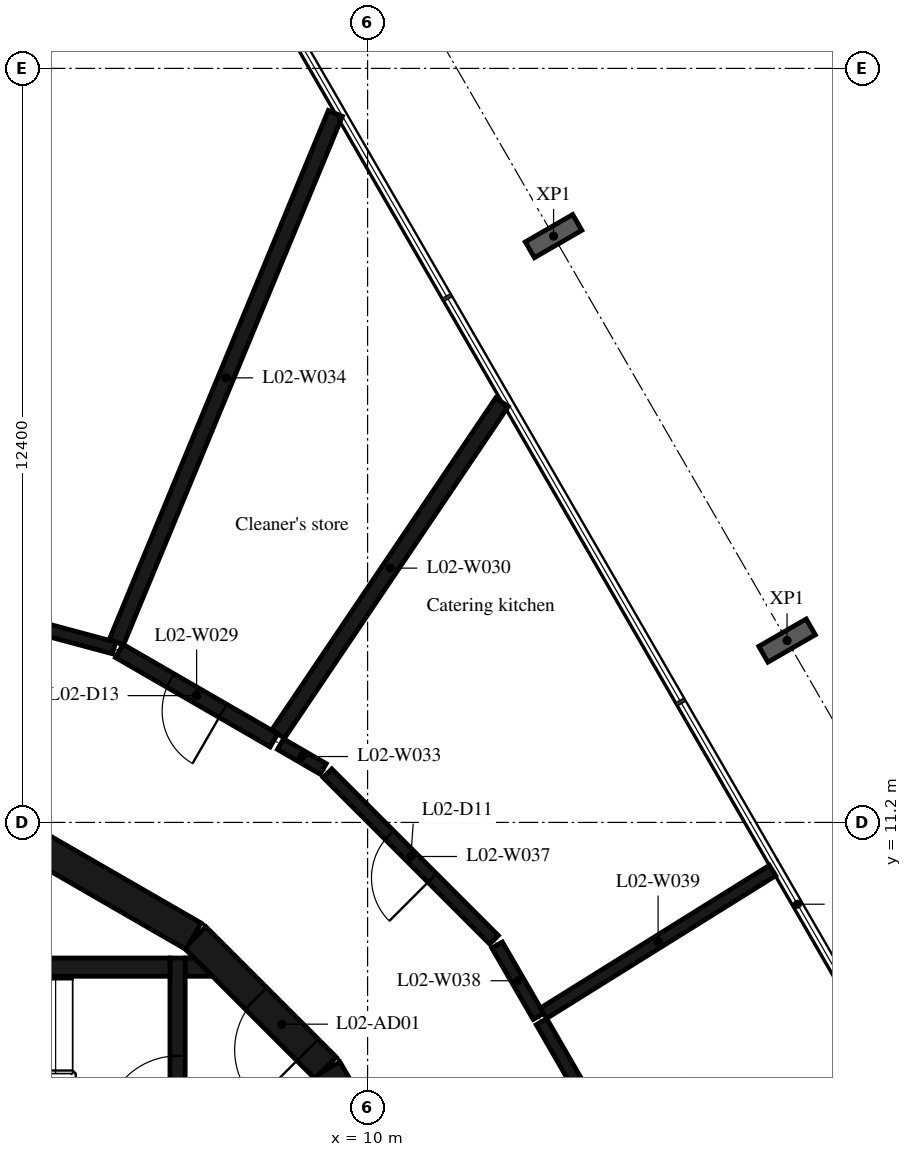
"""IFC4 building model, lengths in metres.
Left out: names, types, materials, properties, quantities, classifications, styles, units other than length and angle.
Written with IfcOpenShell. Run it as: python <this file> out.ifc"""

import sys

from ifc_helpers import new_model, si_unit, direction, frame, frame_2d, origin, origin_2d, place, context, subcontext, project, spatial, polyline, rectangle, i_section, outline, extrude, element, fill, save


model = new_model("IFC4")
c1 = context("Model", 3, precision=1e-05, world=origin(), true_north=direction((0.0, 1.0)))
c2 = subcontext(c1, "Body", "Model", "MODEL_VIEW")
j1 = project(units=[si_unit("LENGTHUNIT", "METRE"), si_unit("PLANEANGLEUNIT", "RADIAN")], contexts=[c1])
p1 = place(None, origin())
s1 = spatial("IfcSite", under=j1, at=p1, CompositionType="ELEMENT")
p2 = place(p1, origin())
s2 = spatial("IfcBuilding", under=s1, at=p2, CompositionType="ELEMENT")
p3 = place(p2, frame((0.0, 0.0, 13.8)))
s3 = spatial("IfcBuildingStorey", under=s2, at=p3, CompositionType="ELEMENT", Elevation=13.8)
for number, where, z_axis, x_axis in (
    (1, (16.899, 14.19, -0.38), (0.0, 0.0, 1.0), (0.5, -0.866, 0.0)),
    (2, (13.059, 20.842, -0.38), (0.0, 0.0, 1.0), (0.5, -0.866, 0.0)),
):
    element("IfcColumn", number, at=place(p3, frame(where, z_axis=z_axis, x_axis=x_axis)), inside=s3, PredefinedType="COLUMN", context=c2, shape_type="SweptSolid", body=[
        extrude(i_section(OverallWidth=0.3, OverallDepth=0.9, WebThickness=0.019, FlangeThickness=0.035, FilletRadius=0.03, at=origin_2d()), origin(), (0.0, 0.0, 1.0), 4.8),
    ])
p4 = place(p3, frame((10.845, 4.51, 0.0), z_axis=(0.0, 0.0, 1.0), x_axis=(-0.500087131594, 0.865975092491, 0.0)))
e3 = element("IfcWall", 3, at=p4, inside=s3, PredefinedType="SHEAR", context=c2, shape_type="SweptSolid", body=[
    extrude(rectangle(XDim=3.033, YDim=0.5, at=frame_2d((1.516, 0.0))), origin(), (0.0, 0.0, 1.0), 4.42),
])
p5 = place(p3, frame((9.308, 7.164, 0.0), z_axis=(0.0, 0.0, 1.0), x_axis=(-0.707106781187, 0.707106781187, 0.0)))
e4 = element("IfcWall", 4, at=p5, inside=s3, PredefinedType="SHEAR", context=c2, shape_type="SweptSolid", body=[
    extrude(rectangle(XDim=3.032, YDim=0.5, at=frame_2d((1.516, 0.0))), origin(), (0.0, 0.0, 1.0), 4.42),
])
p6 = place(p5, frame((0.416, 0.0, 0.0)))
e5 = element("IfcOpeningElement", 5, at=p6, cuts=e4, PredefinedType="OPENING", context=c2, shape_type="SweptSolid", body=[
    extrude(rectangle(XDim=1.2, YDim=2.1, at=frame_2d((0.6, 1.05))), frame((0.0, 0.26, 0.0), z_axis=(0.0, -1.0, 0.0), x_axis=(1.0, 0.0, 0.0)), (0.0, 0.0, 1.0), 0.52),
])
p7 = place(p3, frame((7.137, 9.329, 0.0), z_axis=(0.0, 0.0, 1.0), x_axis=(-0.865975092491, 0.500087131594, 0.0)))
e6 = element("IfcWall", 6, at=p7, inside=s3, PredefinedType="SHEAR", context=c2, shape_type="SweptSolid", body=[
    extrude(rectangle(XDim=3.033, YDim=0.5, at=frame_2d((1.516, 0.0))), origin(), (0.0, 0.0, 1.0), 4.42),
])
p8 = place(p3, frame((0.0, 8.82, 0.0), z_axis=(0.0, 0.0, 1.0), x_axis=(1.0, 0.0, 0.0)))
e7 = element("IfcWall", 7, at=p8, inside=s3, PredefinedType="SHEAR", context=c2, shape_type="SweptSolid", body=[
    extrude(rectangle(XDim=6.75, YDim=0.3, at=frame_2d((3.375, 0.0))), origin(), (0.0, 0.0, 1.0), 4.42),
])
p9 = place(p3, frame((6.875, 5.05, 0.0), z_axis=(0.0, 0.0, 1.0), x_axis=(0.0, 1.0, 0.0)))
e8 = element("IfcWall", 8, at=p9, inside=s3, PredefinedType="SHEAR", context=c2, shape_type="SweptSolid", body=[
    extrude(rectangle(XDim=3.92, YDim=0.25, at=frame_2d((1.96, 0.0))), origin(), (0.0, 0.0, 1.0), 4.42),
])
p10 = place(p9, frame((1.11, 0.0, 0.0)))
e9 = element("IfcOpeningElement", 9, at=p10, cuts=e8, PredefinedType="OPENING", context=c2, shape_type="SweptSolid", body=[
    extrude(rectangle(XDim=1.2, YDim=2.1, at=frame_2d((0.6, 1.05))), frame((0.0, 0.135, 0.0), z_axis=(0.0, -1.0, 0.0), x_axis=(1.0, 0.0, 0.0)), (0.0, 0.0, 1.0), 0.27),
])
p11 = place(p3, origin())
e10 = element("IfcWall", 10, at=p11, inside=s3, PredefinedType="SHEAR", context=c2, shape_type="SweptSolid", body=[
    extrude(outline(polyline([(7.448, 8.67), (7.0, 8.67), (7.0, 8.97), (7.148, 8.97), (7.448, 8.67)])), origin(), (0.0, 0.0, 1.0), 4.42),
])
p12 = place(p3, frame((5.83, 14.07, 0.0), z_axis=(0.0, 0.0, 1.0), x_axis=(-0.965870133458, 0.259026804199, 0.0)))
e11 = element("IfcWall", 11, at=p12, inside=s3, PredefinedType="PARTITIONING", context=c2, shape_type="SweptSolid", body=[
    extrude(rectangle(XDim=3.876, YDim=0.2, at=frame_2d((1.938, 0.0))), origin(), (0.0, 0.0, 1.0), 4.42),
])
p13 = place(p3, frame((8.46, 12.55, 0.0), z_axis=(0.0, 0.0, 1.0), x_axis=(-0.865803467568, 0.500384207931, 0.0)))
e12 = element("IfcWall", 12, at=p13, inside=s3, PredefinedType="PARTITIONING", context=c2, shape_type="SweptSolid", body=[
    extrude(rectangle(XDim=2.938, YDim=0.25, at=frame_2d((1.469, 0.0))), origin(), (0.0, 0.0, 1.0), 4.42),
])
p14 = place(p13, frame((0.969, 0.0, 0.0)))
e13 = element("IfcOpeningElement", 13, at=p14, cuts=e12, PredefinedType="OPENING", context=c2, shape_type="SweptSolid", body=[
    extrude(rectangle(XDim=1.0, YDim=2.1, at=frame_2d((0.5, 1.05))), frame((0.0, 0.135, 0.0), z_axis=(0.0, -1.0, 0.0), x_axis=(1.0, 0.0, 0.0)), (0.0, 0.0, 1.0), 0.27),
])
p15 = place(p3, frame((8.53, 12.654, 0.0), z_axis=(0.0, 0.0, 1.0), x_axis=(0.559160642802, 0.829059331738, 0.0)))
e14 = element("IfcWall", 14, at=p15, inside=s3, PredefinedType="PARTITIONING", context=c2, shape_type="SweptSolid", body=[
    extrude(rectangle(XDim=6.582, YDim=0.25, at=frame_2d((3.291, 0.0))), origin(), (0.0, 0.0, 1.0), 4.42),
])
p16 = place(p3, frame((9.27, 12.08, 0.0), z_axis=(0.0, 0.0, 1.0), x_axis=(-0.864965895546, 0.501830648268, 0.0)))
e15 = element("IfcWall", 15, at=p16, inside=s3, PredefinedType="PARTITIONING", context=c2, shape_type="SweptSolid", body=[
    extrude(rectangle(XDim=0.812, YDim=0.2, at=frame_2d((0.406, 0.0))), origin(), (0.0, 0.0, 1.0), 4.42),
])
p17 = place(p3, frame((9.47, 22.86, 0.0), z_axis=(0.0, 0.0, 1.0), x_axis=(-0.382599926304, -0.923914117433, 0.0)))
e16 = element("IfcWall", 16, at=p17, inside=s3, PredefinedType="PARTITIONING", context=c2, shape_type="SweptSolid", body=[
    extrude(rectangle(XDim=9.414, YDim=0.25, at=frame_2d((4.707, 0.0))), origin(), (0.0, 0.0, 1.0), 4.42),
])
p18 = place(p3, frame((12.08, 9.27, 0.0), z_axis=(0.0, 0.0, 1.0), x_axis=(-0.707106781187, 0.707106781187, 0.0)))
e17 = element("IfcWall", 17, at=p18, inside=s3, PredefinedType="PARTITIONING", context=c2, shape_type="SweptSolid", body=[
    extrude(rectangle(XDim=3.874, YDim=0.2, at=frame_2d((1.937, 0.0))), origin(), (0.0, 0.0, 1.0), 4.42),
])
p19 = place(p18, frame((1.437, 0.0, 0.0)))
e18 = element("IfcOpeningElement", 18, at=p19, cuts=e17, PredefinedType="OPENING", context=c2, shape_type="SweptSolid", body=[
    extrude(rectangle(XDim=1.0, YDim=2.1, at=frame_2d((0.5, 1.05))), frame((0.0, 0.11, 0.0), z_axis=(0.0, -1.0, 0.0), x_axis=(1.0, 0.0, 0.0)), (0.0, 0.0, 1.0), 0.22),
])
p20 = place(p3, frame((12.81, 8.01, 0.0), z_axis=(0.0, 0.0, 1.0), x_axis=(-0.501305875941, 0.865270142064, 0.0)))
e19 = element("IfcWall", 19, at=p20, inside=s3, PredefinedType="PARTITIONING", context=c2, shape_type="SweptSolid", body=[
    extrude(rectangle(XDim=1.356, YDim=0.2, at=frame_2d((0.678, 0.0))), origin(), (0.0, 0.0, 1.0), 4.42),
])
p21 = place(p3, frame((12.895, 8.063, 0.0), z_axis=(0.0, 0.0, 1.0), x_axis=(0.848634527268, 0.528979620712, 0.0)))
e20 = element("IfcWall", 20, at=p21, inside=s3, PredefinedType="PARTITIONING", context=c2, shape_type="SweptSolid", body=[
    extrude(rectangle(XDim=4.437, YDim=0.2, at=frame_2d((2.218, 0.0))), origin(), (0.0, 0.0, 1.0), 4.42),
])
p22 = place(p3, frame((14.07, 5.83, 0.0), z_axis=(0.0, 0.0, 1.0), x_axis=(-0.500439091614, 0.865771745661, 0.0)))
e21 = element("IfcWall", 21, at=p22, inside=s3, PredefinedType="PARTITIONING", context=c2, shape_type="SweptSolid", body=[
    extrude(rectangle(XDim=2.418, YDim=0.2, at=frame_2d((1.209, 0.0))), origin(), (0.0, 0.0, 1.0), 4.42),
])
p23 = place(p10, origin())
e22 = element("IfcDoor", 22, at=p23, inside=s3, OperationType="SINGLE_SWING_LEFT", PredefinedType="DOOR", context=c2, shape_type="SweptSolid", body=[
    extrude(rectangle(XDim=1.2, YDim=2.1, at=frame_2d((0.6, 1.05))), frame((0.0, 0.025, 0.0), z_axis=(0.0, -1.0, 0.0), x_axis=(1.0, 0.0, 0.0)), (0.0, 0.0, 1.0), 0.05),
])
fill(e9, e22)
p24 = place(p6, origin())
e23 = element("IfcDoor", 23, at=p24, inside=s3, OperationType="SINGLE_SWING_RIGHT", PredefinedType="DOOR", context=c2, shape_type="SweptSolid", body=[
    extrude(rectangle(XDim=1.2, YDim=2.1, at=frame_2d((0.6, 1.05))), frame((0.0, 0.025, 0.0), z_axis=(0.0, -1.0, 0.0), x_axis=(1.0, 0.0, 0.0)), (0.0, 0.0, 1.0), 0.05),
])
fill(e5, e23)
p25 = place(p19, origin())
e24 = element("IfcDoor", 24, at=p25, inside=s3, OperationType="SINGLE_SWING_LEFT", PredefinedType="DOOR", context=c2, shape_type="SweptSolid", body=[
    extrude(rectangle(XDim=1.0, YDim=2.1, at=frame_2d((0.5, 1.05))), frame((0.0, 0.025, 0.0), z_axis=(0.0, -1.0, 0.0), x_axis=(1.0, 0.0, 0.0)), (0.0, 0.0, 1.0), 0.05),
])
fill(e18, e24)
p26 = place(p14, origin())
e25 = element("IfcDoor", 25, at=p26, inside=s3, OperationType="SINGLE_SWING_LEFT", PredefinedType="DOOR", context=c2, shape_type="SweptSolid", body=[
    extrude(rectangle(XDim=1.0, YDim=2.1, at=frame_2d((0.5, 1.05))), frame((0.0, 0.025, 0.0), z_axis=(0.0, -1.0, 0.0), x_axis=(1.0, 0.0, 0.0)), (0.0, 0.0, 1.0), 0.05),
])
fill(e13, e25)
save(model, sys.argv[1])
